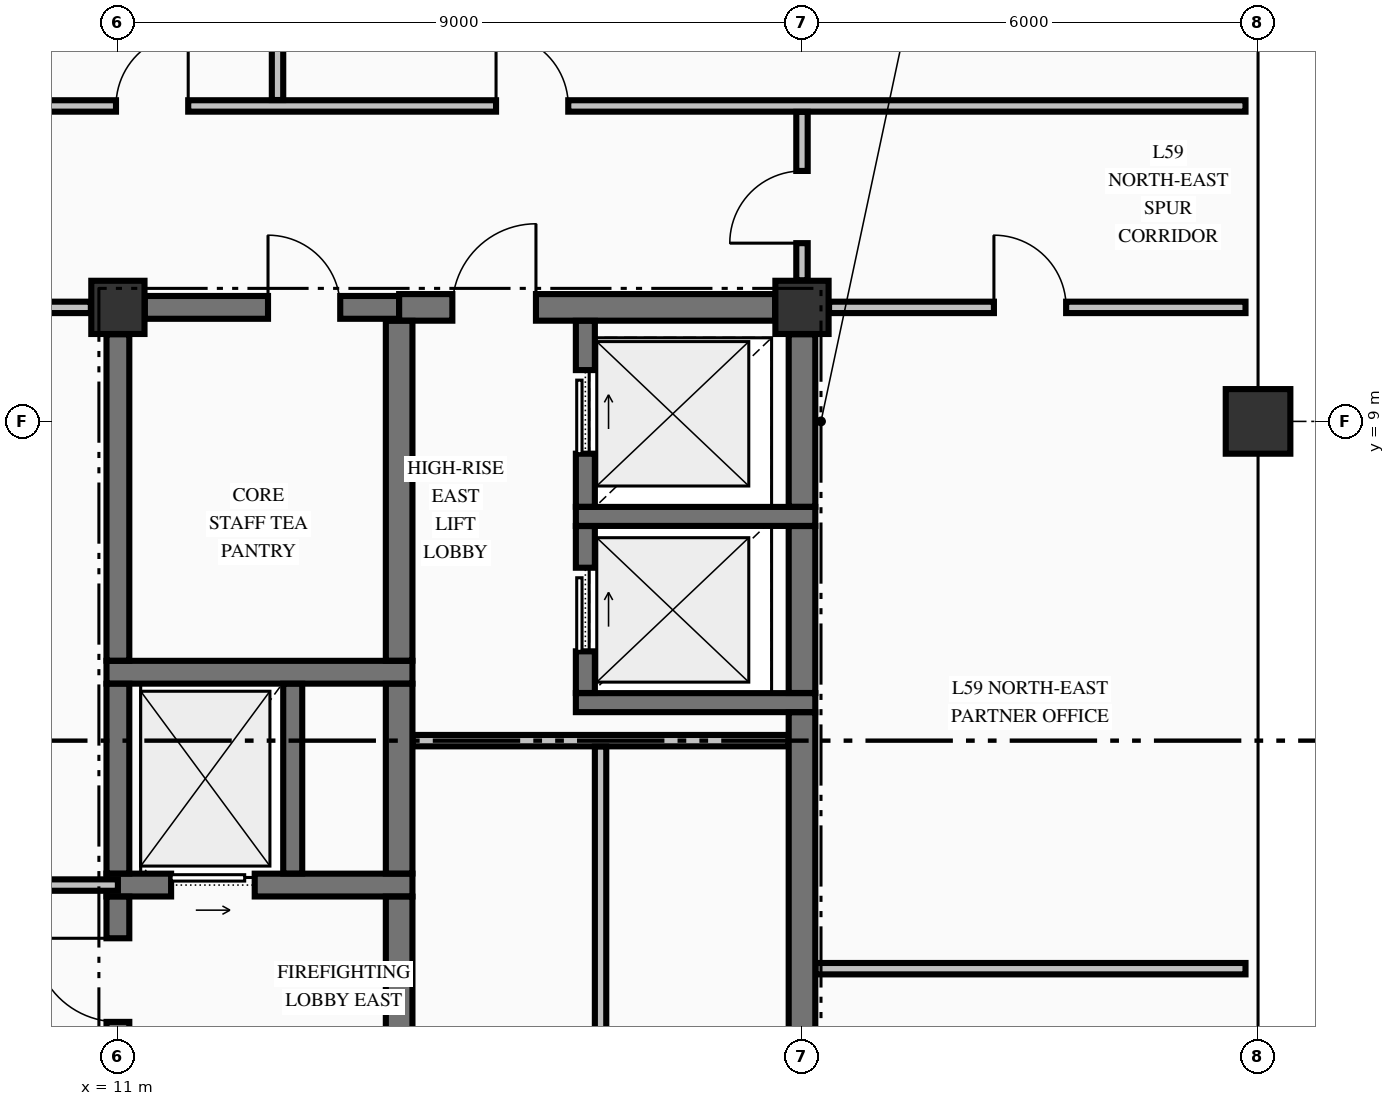
"""IFC4 building model, lengths in metres.
Left out: names, types, materials, properties, quantities, classifications, styles, units other than length and angle.
Written with IfcOpenShell. Run it as: python <this file> out.ifc"""

import sys

from ifc_helpers import new_model, si_unit, direction, frame, frame_2d, origin, origin_2d, place, context, subcontext, project, spatial, rectangle, extrude, element, fill, save


model = new_model("IFC4")
c1 = context("Model", 3, precision=1e-05, world=origin(), true_north=direction((0.0, 1.0)))
c2 = subcontext(c1, "Body", "Model", "MODEL_VIEW")
j1 = project(units=[si_unit("LENGTHUNIT", "METRE"), si_unit("PLANEANGLEUNIT", "RADIAN")], contexts=[c1])
p1 = place(None, origin())
s1 = spatial("IfcSite", under=j1, at=p1, CompositionType="ELEMENT")
p2 = place(p1, origin())
s2 = spatial("IfcBuilding", under=s1, at=p2, CompositionType="ELEMENT")
p3 = place(p2, frame((0.0, 0.0, 226.82)))
s3 = spatial("IfcBuildingStorey", under=s2, at=p3, CompositionType="ELEMENT", Elevation=226.82)
p4 = place(p3, frame((26.0, 9.0, -0.425), z_axis=(0.0, 0.0, 1.0), x_axis=(1.0, 0.0, 0.0)))
e1 = element("IfcColumn", 1, at=p4, inside=s3, PredefinedType="COLUMN", context=c2, shape_type="SweptSolid", body=[
    extrude(rectangle(XDim=0.85, YDim=0.85, at=origin_2d()), origin(), (0.0, 0.0, 1.0), 3.405),
])
for number, where, z_axis, x_axis in (
    (2, (11.0, 10.5, -0.425), (0.0, 0.0, 1.0), (1.0, 0.0, 0.0)),
    (3, (20.0, 10.5, -0.425), (0.0, 0.0, 1.0), (1.0, 0.0, 0.0)),
):
    element("IfcColumn", number, at=place(p3, frame(where, z_axis=z_axis, x_axis=x_axis)), inside=s3, PredefinedType="COLUMN", context=c2, shape_type="SweptSolid", body=[
        extrude(rectangle(XDim=0.7, YDim=0.7, at=origin_2d()), origin(), (0.0, 0.0, 1.0), 3.405),
    ])
p5 = place(p3, frame((10.85, 2.9, 0.0), z_axis=(0.0, 0.0, 1.0), x_axis=(1.0, 0.0, 0.0)))
e4 = element("IfcWall", 4, at=p5, inside=s3, PredefinedType="SHEAR", context=c2, shape_type="SweptSolid", body=[
    extrude(rectangle(XDim=4.025, YDim=0.3, at=frame_2d((2.012, 0.0))), origin(), (0.0, 0.0, 1.0), 2.98),
])
p6 = place(p5, frame((0.85, 0.0, 0.0)))
e5 = element("IfcOpeningElement", 5, at=p6, cuts=e4, PredefinedType="OPENING", context=c2, shape_type="SweptSolid", body=[
    extrude(rectangle(XDim=1.1, YDim=2.2, at=frame_2d((0.55, 1.1))), frame((0.0, 0.16, 0.0), z_axis=(0.0, -1.0, 0.0), x_axis=(1.0, 0.0, 0.0)), (0.0, 0.0, 1.0), 0.32),
])
p7 = place(p3, frame((17.025, 5.3, 0.0), z_axis=(0.0, 0.0, 1.0), x_axis=(1.0, 0.0, 0.0)))
e6 = element("IfcWall", 6, at=p7, inside=s3, PredefinedType="SOLIDWALL", context=c2, shape_type="SweptSolid", body=[
    extrude(rectangle(XDim=3.15, YDim=0.25, at=frame_2d((1.575, 0.0))), origin(), (0.0, 0.0, 1.0), 2.98),
])
p8 = place(p3, frame((10.85, 5.7, 0.0), z_axis=(0.0, 0.0, 1.0), x_axis=(1.0, 0.0, 0.0)))
e7 = element("IfcWall", 7, at=p8, inside=s3, PredefinedType="SHEAR", context=c2, shape_type="SweptSolid", body=[
    extrude(rectangle(XDim=4.025, YDim=0.3, at=frame_2d((2.012, 0.0))), origin(), (0.0, 0.0, 1.0), 2.98),
])
p9 = place(p3, frame((17.025, 7.75, 0.0), z_axis=(0.0, 0.0, 1.0), x_axis=(1.0, 0.0, 0.0)))
e8 = element("IfcWall", 8, at=p9, inside=s3, PredefinedType="SOLIDWALL", context=c2, shape_type="SweptSolid", body=[
    extrude(rectangle(XDim=3.15, YDim=0.25, at=frame_2d((1.575, 0.0))), origin(), (0.0, 0.0, 1.0), 2.98),
])
p10 = place(p3, frame((11.354, 10.5, 0.0), z_axis=(0.0, 0.0, 1.0), x_axis=(1.0, 0.0, 0.0)))
e9 = element("IfcWall", 9, at=p10, inside=s3, PredefinedType="SHEAR", context=c2, shape_type="SweptSolid", body=[
    extrude(rectangle(XDim=3.346, YDim=0.3, at=frame_2d((1.673, 0.0))), origin(), (0.0, 0.0, 1.0), 2.98),
])
p11 = place(p10, frame((1.621, 0.0, 0.0)))
e10 = element("IfcOpeningElement", 10, at=p11, cuts=e9, PredefinedType="OPENING", context=c2, shape_type="SweptSolid", body=[
    extrude(rectangle(XDim=0.95, YDim=2.15, at=frame_2d((0.475, 1.075))), frame((0.0, 0.16, 0.0), z_axis=(0.0, -1.0, 0.0), x_axis=(1.0, 0.0, 0.0)), (0.0, 0.0, 1.0), 0.32),
])
p12 = place(p3, frame((14.7, 10.5, 0.0), z_axis=(0.0, 0.0, 1.0), x_axis=(1.0, 0.0, 0.0)))
e11 = element("IfcWall", 11, at=p12, inside=s3, PredefinedType="SHEAR", context=c2, shape_type="SweptSolid", body=[
    extrude(rectangle(XDim=4.946, YDim=0.35, at=frame_2d((2.473, 0.0))), origin(), (0.0, 0.0, 1.0), 2.98),
])
p13 = place(p12, frame((0.7, 0.0, 0.0)))
e12 = element("IfcOpeningElement", 12, at=p13, cuts=e11, PredefinedType="OPENING", context=c2, shape_type="SweptSolid", body=[
    extrude(rectangle(XDim=1.1, YDim=2.15, at=frame_2d((0.55, 1.075))), frame((0.0, 0.185, 0.0), z_axis=(0.0, -1.0, 0.0), x_axis=(1.0, 0.0, 0.0)), (0.0, 0.0, 1.0), 0.37),
])
p14 = place(p3, frame((20.178, 1.8, 0.0), z_axis=(0.0, 0.0, 1.0), x_axis=(1.0, 0.0, 0.0)))
e13 = element("IfcWall", 13, at=p14, inside=s3, PredefinedType="PARTITIONING", context=c2, shape_type="SweptSolid", body=[
    extrude(rectangle(XDim=5.657, YDim=0.15, at=frame_2d((2.829, 0.0))), origin(), (0.0, 0.0, 1.0), 2.98),
])
p15 = place(p3, frame((-11.0, 2.9, 0.0), z_axis=(0.0, 0.0, 1.0), x_axis=(1.0, 0.0, 0.0)))
e14 = element("IfcWall", 14, at=p15, inside=s3, PredefinedType="PARTITIONING", context=c2, shape_type="SweptSolid", body=[
    extrude(rectangle(XDim=22.0, YDim=0.15, at=frame_2d((11.0, 0.0))), origin(), (0.0, 0.0, 1.0), 2.98),
])
p16 = place(p15, frame((14.65, 0.0, 0.0)))
e15 = element("IfcOpeningElement", 15, at=p16, cuts=e14, PredefinedType="OPENING", context=c2, shape_type="SweptSolid", body=[
    extrude(rectangle(XDim=1.1, YDim=2.15, at=frame_2d((0.55, 1.075))), frame((0.0, 0.085, 0.0), z_axis=(0.0, -1.0, 0.0), x_axis=(1.0, 0.0, 0.0)), (0.0, 0.0, 1.0), 0.17),
])
p17 = place(p15, frame((6.525, 0.0, 0.0)))
e16 = element("IfcOpeningElement", 16, at=p17, cuts=e14, PredefinedType="OPENING", context=c2, shape_type="SweptSolid", body=[
    extrude(rectangle(XDim=1.05, YDim=2.15, at=frame_2d((0.525, 1.075))), frame((0.0, 0.085, 0.0), z_axis=(0.0, -1.0, 0.0), x_axis=(1.0, 0.0, 0.0)), (0.0, 0.0, 1.0), 0.17),
])
p18 = place(p15, frame((18.6, 0.0, 0.0)))
e17 = element("IfcOpeningElement", 17, at=p18, cuts=e14, PredefinedType="OPENING", context=c2, shape_type="SweptSolid", body=[
    extrude(rectangle(XDim=1.1, YDim=2.15, at=frame_2d((0.55, 1.075))), frame((0.0, 0.085, 0.0), z_axis=(0.0, -1.0, 0.0), x_axis=(1.0, 0.0, 0.0)), (0.0, 0.0, 1.0), 0.17),
])
p19 = place(p3, frame((14.878, 4.8, 0.0), z_axis=(0.0, 0.0, 1.0), x_axis=(1.0, 0.0, 0.0)))
e18 = element("IfcWall", 18, at=p19, inside=s3, PredefinedType="PARTITIONING", context=c2, shape_type="SweptSolid", body=[
    extrude(rectangle(XDim=4.944, YDim=0.15, at=frame_2d((2.472, 0.0))), origin(), (0.0, 0.0, 1.0), 2.98),
])
p20 = place(p3, frame((-10.644, 10.5, 0.0), z_axis=(0.0, 0.0, 1.0), x_axis=(1.0, 0.0, 0.0)))
e19 = element("IfcWall", 19, at=p20, inside=s3, PredefinedType="PARTITIONING", context=c2, shape_type="SweptSolid", body=[
    extrude(rectangle(XDim=21.288, YDim=0.15, at=frame_2d((10.644, 0.0))), origin(), (0.0, 0.0, 1.0), 2.98),
])
p21 = place(p20, frame((14.294, 0.0, 0.0)))
e20 = element("IfcOpeningElement", 20, at=p21, cuts=e19, PredefinedType="OPENING", context=c2, shape_type="SweptSolid", body=[
    extrude(rectangle(XDim=1.1, YDim=2.15, at=frame_2d((0.55, 1.075))), frame((0.0, 0.085, 0.0), z_axis=(0.0, -1.0, 0.0), x_axis=(1.0, 0.0, 0.0)), (0.0, 0.0, 1.0), 0.17),
])
p22 = place(p3, frame((20.356, 10.5, 0.0), z_axis=(0.0, 0.0, 1.0), x_axis=(1.0, 0.0, 0.0)))
e21 = element("IfcWall", 21, at=p22, inside=s3, PredefinedType="PARTITIONING", context=c2, shape_type="SweptSolid", body=[
    extrude(rectangle(XDim=5.479, YDim=0.15, at=frame_2d((2.74, 0.0))), origin(), (0.0, 0.0, 1.0), 2.98),
])
p23 = place(p22, frame((2.169, 0.0, 0.0)))
e22 = element("IfcOpeningElement", 22, at=p23, cuts=e21, PredefinedType="OPENING", context=c2, shape_type="SweptSolid", body=[
    extrude(rectangle(XDim=0.95, YDim=2.15, at=frame_2d((0.475, 1.075))), frame((0.0, 0.085, 0.0), z_axis=(0.0, -1.0, 0.0), x_axis=(1.0, 0.0, 0.0)), (0.0, 0.0, 1.0), 0.17),
])
p24 = place(p3, frame((-20.075, 13.15, 0.0), z_axis=(0.0, 0.0, 1.0), x_axis=(1.0, 0.0, 0.0)))
e23 = element("IfcWall", 23, at=p24, inside=s3, PredefinedType="PARTITIONING", context=c2, shape_type="SweptSolid", body=[
    extrude(rectangle(XDim=45.91, YDim=0.15, at=frame_2d((22.955, 0.0))), origin(), (0.0, 0.0, 1.0), 2.98),
])
p25 = place(p24, frame((9.05, 0.0, 0.0)))
e24 = element("IfcOpeningElement", 24, at=p25, cuts=e23, PredefinedType="OPENING", context=c2, shape_type="SweptSolid", body=[
    extrude(rectangle(XDim=0.95, YDim=2.15, at=frame_2d((0.475, 1.075))), frame((0.0, 0.085, 0.0), z_axis=(0.0, -1.0, 0.0), x_axis=(1.0, 0.0, 0.0)), (0.0, 0.0, 1.0), 0.17),
])
p26 = place(p24, frame((15.25, 0.0, 0.0)))
e25 = element("IfcOpeningElement", 25, at=p26, cuts=e23, PredefinedType="OPENING", context=c2, shape_type="SweptSolid", body=[
    extrude(rectangle(XDim=1.05, YDim=2.15, at=frame_2d((0.525, 1.075))), frame((0.0, 0.085, 0.0), z_axis=(0.0, -1.0, 0.0), x_axis=(1.0, 0.0, 0.0)), (0.0, 0.0, 1.0), 0.17),
])
p27 = place(p24, frame((23.3, 0.0, 0.0)))
e26 = element("IfcOpeningElement", 26, at=p27, cuts=e23, PredefinedType="OPENING", context=c2, shape_type="SweptSolid", body=[
    extrude(rectangle(XDim=0.95, YDim=2.15, at=frame_2d((0.475, 1.075))), frame((0.0, 0.085, 0.0), z_axis=(0.0, -1.0, 0.0), x_axis=(1.0, 0.0, 0.0)), (0.0, 0.0, 1.0), 0.17),
])
p28 = place(p24, frame((31.05, 0.0, 0.0)))
e27 = element("IfcOpeningElement", 27, at=p28, cuts=e23, PredefinedType="OPENING", context=c2, shape_type="SweptSolid", body=[
    extrude(rectangle(XDim=0.95, YDim=2.15, at=frame_2d((0.475, 1.075))), frame((0.0, 0.085, 0.0), z_axis=(0.0, -1.0, 0.0), x_axis=(1.0, 0.0, 0.0)), (0.0, 0.0, 1.0), 0.17),
])
p29 = place(p24, frame((36.05, 0.0, 0.0)))
e28 = element("IfcOpeningElement", 28, at=p29, cuts=e23, PredefinedType="OPENING", context=c2, shape_type="SweptSolid", body=[
    extrude(rectangle(XDim=0.95, YDim=2.15, at=frame_2d((0.475, 1.075))), frame((0.0, 0.085, 0.0), z_axis=(0.0, -1.0, 0.0), x_axis=(1.0, 0.0, 0.0)), (0.0, 0.0, 1.0), 0.17),
])
p30 = place(p3, frame((11.0, 0.354, 0.0), z_axis=(0.0, 0.0, 1.0), x_axis=(0.0, 1.0, 0.0)))
e29 = element("IfcWall", 29, at=p30, inside=s3, PredefinedType="SHEAR", context=c2, shape_type="SweptSolid", body=[
    extrude(rectangle(XDim=2.394, YDim=0.3, at=frame_2d((1.197, 0.0))), origin(), (0.0, 0.0, 1.0), 2.98),
])
p31 = place(p30, frame((0.746, 0.0, 0.0)))
e30 = element("IfcOpeningElement", 30, at=p31, cuts=e29, PredefinedType="OPENING", context=c2, shape_type="SweptSolid", body=[
    extrude(rectangle(XDim=1.1, YDim=2.15, at=frame_2d((0.55, 1.075))), frame((0.0, 0.16, 0.0), z_axis=(0.0, -1.0, 0.0), x_axis=(1.0, 0.0, 0.0)), (0.0, 0.0, 1.0), 0.32),
])
p32 = place(p3, frame((11.0, 3.052, 0.0), z_axis=(0.0, 0.0, 1.0), x_axis=(0.0, 1.0, 0.0)))
e31 = element("IfcWall", 31, at=p32, inside=s3, PredefinedType="SHEAR", context=c2, shape_type="SweptSolid", body=[
    extrude(rectangle(XDim=2.496, YDim=0.3, at=frame_2d((1.248, 0.0))), origin(), (0.0, 0.0, 1.0), 2.98),
])
p33 = place(p3, frame((11.0, 5.852, 0.0), z_axis=(0.0, 0.0, 1.0), x_axis=(0.0, 1.0, 0.0)))
e32 = element("IfcWall", 32, at=p33, inside=s3, PredefinedType="SHEAR", context=c2, shape_type="SweptSolid", body=[
    extrude(rectangle(XDim=4.294, YDim=0.3, at=frame_2d((2.147, 0.0))), origin(), (0.0, 0.0, 1.0), 2.98),
])
p34 = place(p3, frame((13.3, 3.052, 0.0), z_axis=(0.0, 0.0, 1.0), x_axis=(0.0, 1.0, 0.0)))
e33 = element("IfcWall", 33, at=p34, inside=s3, PredefinedType="SOLIDWALL", context=c2, shape_type="SweptSolid", body=[
    extrude(rectangle(XDim=2.496, YDim=0.25, at=frame_2d((1.248, 0.0))), origin(), (0.0, 0.0, 1.0), 2.98),
])
p35 = place(p3, frame((14.7, -0.098, 0.0), z_axis=(0.0, 0.0, 1.0), x_axis=(0.0, 1.0, 0.0)))
e34 = element("IfcWall", 34, at=p35, inside=s3, PredefinedType="SHEAR", context=c2, shape_type="SweptSolid", body=[
    extrude(rectangle(XDim=2.846, YDim=0.35, at=frame_2d((1.423, 0.0))), origin(), (0.0, 0.0, 1.0), 2.98),
])
p36 = place(p3, frame((14.7, 3.052, 0.0), z_axis=(0.0, 0.0, 1.0), x_axis=(0.0, 1.0, 0.0)))
e35 = element("IfcWall", 35, at=p36, inside=s3, PredefinedType="SHEAR", context=c2, shape_type="SweptSolid", body=[
    extrude(rectangle(XDim=2.496, YDim=0.35, at=frame_2d((1.248, 0.0))), origin(), (0.0, 0.0, 1.0), 2.98),
])
p37 = place(p3, frame((14.7, 5.852, 0.0), z_axis=(0.0, 0.0, 1.0), x_axis=(0.0, 1.0, 0.0)))
e36 = element("IfcWall", 36, at=p37, inside=s3, PredefinedType="SHEAR", context=c2, shape_type="SweptSolid", body=[
    extrude(rectangle(XDim=4.471, YDim=0.35, at=frame_2d((2.235, 0.0))), origin(), (0.0, 0.0, 1.0), 2.98),
])
p38 = place(p3, frame((17.15, 5.427, 0.0), z_axis=(0.0, 0.0, 1.0), x_axis=(0.0, 1.0, 0.0)))
e37 = element("IfcWall", 37, at=p38, inside=s3, PredefinedType="SOLIDWALL", context=c2, shape_type="SweptSolid", body=[
    extrude(rectangle(XDim=2.196, YDim=0.25, at=frame_2d((1.098, 0.0))), origin(), (0.0, 0.0, 1.0), 2.98),
])
p39 = place(p38, frame((0.548, 0.0, 0.0)))
e38 = element("IfcOpeningElement", 38, at=p39, cuts=e37, PredefinedType="OPENING", context=c2, shape_type="SweptSolid", body=[
    extrude(rectangle(XDim=1.1, YDim=2.2, at=frame_2d((0.55, 1.1))), frame((0.0, 0.135, 0.0), z_axis=(0.0, -1.0, 0.0), x_axis=(1.0, 0.0, 0.0)), (0.0, 0.0, 1.0), 0.27),
])
p40 = place(p3, frame((17.15, 7.877, 0.0), z_axis=(0.0, 0.0, 1.0), x_axis=(0.0, 1.0, 0.0)))
e39 = element("IfcWall", 39, at=p40, inside=s3, PredefinedType="SOLIDWALL", context=c2, shape_type="SweptSolid", body=[
    extrude(rectangle(XDim=2.446, YDim=0.25, at=frame_2d((1.223, 0.0))), origin(), (0.0, 0.0, 1.0), 2.98),
])
p41 = place(p40, frame((0.698, 0.0, 0.0)))
e40 = element("IfcOpeningElement", 40, at=p41, cuts=e39, PredefinedType="OPENING", context=c2, shape_type="SweptSolid", body=[
    extrude(rectangle(XDim=1.1, YDim=2.2, at=frame_2d((0.55, 1.1))), frame((0.0, 0.135, 0.0), z_axis=(0.0, -1.0, 0.0), x_axis=(1.0, 0.0, 0.0)), (0.0, 0.0, 1.0), 0.27),
])
p42 = place(p3, frame((20.0, 0.354, 0.0), z_axis=(0.0, 0.0, 1.0), x_axis=(0.0, 1.0, 0.0)))
e41 = element("IfcWall", 41, at=p42, inside=s3, PredefinedType="SHEAR", context=c2, shape_type="SweptSolid", body=[
    extrude(rectangle(XDim=4.819, YDim=0.35, at=frame_2d((2.41, 0.0))), origin(), (0.0, 0.0, 1.0), 2.98),
])
p43 = place(p3, frame((20.0, 5.427, 0.0), z_axis=(0.0, 0.0, 1.0), x_axis=(0.0, 1.0, 0.0)))
e42 = element("IfcWall", 42, at=p43, inside=s3, PredefinedType="SHEAR", context=c2, shape_type="SweptSolid", body=[
    extrude(rectangle(XDim=2.196, YDim=0.35, at=frame_2d((1.098, 0.0))), origin(), (0.0, 0.0, 1.0), 2.98),
])
p44 = place(p3, frame((20.0, 7.877, 0.0), z_axis=(0.0, 0.0, 1.0), x_axis=(0.0, 1.0, 0.0)))
e43 = element("IfcWall", 43, at=p44, inside=s3, PredefinedType="SHEAR", context=c2, shape_type="SweptSolid", body=[
    extrude(rectangle(XDim=2.269, YDim=0.35, at=frame_2d((1.135, 0.0))), origin(), (0.0, 0.0, 1.0), 2.98),
])
p45 = place(p3, frame((13.1, 13.228, 0.0), z_axis=(0.0, 0.0, 1.0), x_axis=(0.0, 1.0, 0.0)))
e44 = element("IfcWall", 44, at=p45, inside=s3, PredefinedType="PARTITIONING", context=c2, shape_type="SweptSolid", body=[
    extrude(rectangle(XDim=10.107, YDim=0.15, at=frame_2d((5.053, 0.0))), origin(), (0.0, 0.0, 1.0), 2.98),
])
p46 = place(p3, frame((17.35, -9.772, 0.0), z_axis=(0.0, 0.0, 1.0), x_axis=(0.0, 1.0, 0.0)))
e45 = element("IfcWall", 45, at=p46, inside=s3, PredefinedType="PARTITIONING", context=c2, shape_type="SweptSolid", body=[
    extrude(rectangle(XDim=14.494, YDim=0.15, at=frame_2d((7.247, 0.0))), origin(), (0.0, 0.0, 1.0), 2.98),
])
p47 = place(p3, frame((20.0, 10.856, 0.0), z_axis=(0.0, 0.0, 1.0), x_axis=(0.0, 1.0, 0.0)))
e46 = element("IfcWall", 46, at=p47, inside=s3, PredefinedType="PARTITIONING", context=c2, shape_type="SweptSolid", body=[
    extrude(rectangle(XDim=2.216, YDim=0.15, at=frame_2d((1.108, 0.0))), origin(), (0.0, 0.0, 1.0), 2.98),
])
p48 = place(p47, frame((0.489, 0.0, 0.0)))
e47 = element("IfcOpeningElement", 47, at=p48, cuts=e46, PredefinedType="OPENING", context=c2, shape_type="SweptSolid", body=[
    extrude(rectangle(XDim=0.95, YDim=2.15, at=frame_2d((0.475, 1.075))), frame((0.0, 0.085, 0.0), z_axis=(0.0, -1.0, 0.0), x_axis=(1.0, 0.0, 0.0)), (0.0, 0.0, 1.0), 0.17),
])
p49 = place(p31, origin())
e48 = element("IfcDoor", 48, at=p49, inside=s3, OperationType="SINGLE_SWING_RIGHT", PredefinedType="DOOR", context=c2, shape_type="SweptSolid", body=[
    extrude(rectangle(XDim=1.1, YDim=2.15, at=frame_2d((0.55, 1.075))), frame((0.0, 0.025, 0.0), z_axis=(0.0, -1.0, 0.0), x_axis=(1.0, 0.0, 0.0)), (0.0, 0.0, 1.0), 0.05),
])
fill(e30, e48)
p50 = place(p6, origin())
e49 = element("IfcDoor", 49, at=p50, inside=s3, OperationType="SLIDING_TO_RIGHT", PredefinedType="DOOR", context=c2, shape_type="SweptSolid", body=[
    extrude(rectangle(XDim=1.1, YDim=2.2, at=frame_2d((0.55, 1.1))), frame((0.0, 0.025, 0.0), z_axis=(0.0, -1.0, 0.0), x_axis=(1.0, 0.0, 0.0)), (0.0, 0.0, 1.0), 0.05),
])
fill(e5, e49)
p51 = place(p11, origin())
e50 = element("IfcDoor", 50, at=p51, inside=s3, OperationType="SINGLE_SWING_LEFT", PredefinedType="DOOR", context=c2, shape_type="SweptSolid", body=[
    extrude(rectangle(XDim=0.95, YDim=2.15, at=frame_2d((0.475, 1.075))), frame((0.0, 0.025, 0.0), z_axis=(0.0, -1.0, 0.0), x_axis=(1.0, 0.0, 0.0)), (0.0, 0.0, 1.0), 0.05),
])
fill(e10, e50)
p52 = place(p39, origin())
e51 = element("IfcDoor", 51, at=p52, inside=s3, OperationType="SLIDING_TO_RIGHT", PredefinedType="DOOR", context=c2, shape_type="SweptSolid", body=[
    extrude(rectangle(XDim=1.1, YDim=2.2, at=frame_2d((0.55, 1.1))), frame((0.0, 0.025, 0.0), z_axis=(0.0, -1.0, 0.0), x_axis=(1.0, 0.0, 0.0)), (0.0, 0.0, 1.0), 0.05),
])
fill(e38, e51)
p53 = place(p41, origin())
e52 = element("IfcDoor", 52, at=p53, inside=s3, OperationType="SLIDING_TO_RIGHT", PredefinedType="DOOR", context=c2, shape_type="SweptSolid", body=[
    extrude(rectangle(XDim=1.1, YDim=2.2, at=frame_2d((0.55, 1.1))), frame((0.0, 0.025, 0.0), z_axis=(0.0, -1.0, 0.0), x_axis=(1.0, 0.0, 0.0)), (0.0, 0.0, 1.0), 0.05),
])
fill(e40, e52)
p54 = place(p13, origin())
e53 = element("IfcDoor", 53, at=p54, inside=s3, OperationType="SINGLE_SWING_RIGHT", PredefinedType="DOOR", context=c2, shape_type="SweptSolid", body=[
    extrude(rectangle(XDim=1.1, YDim=2.15, at=frame_2d((0.55, 1.075))), frame((0.0, 0.025, 0.0), z_axis=(0.0, -1.0, 0.0), x_axis=(1.0, 0.0, 0.0)), (0.0, 0.0, 1.0), 0.05),
])
fill(e12, e53)
p55 = place(p28, origin())
e54 = element("IfcDoor", 54, at=p55, inside=s3, OperationType="SINGLE_SWING_RIGHT", PredefinedType="DOOR", context=c2, shape_type="SweptSolid", body=[
    extrude(rectangle(XDim=0.95, YDim=2.15, at=frame_2d((0.475, 1.075))), frame((0.0, 0.025, 0.0), z_axis=(0.0, -1.0, 0.0), x_axis=(1.0, 0.0, 0.0)), (0.0, 0.0, 1.0), 0.05),
])
fill(e27, e54)
p56 = place(p29, origin())
e55 = element("IfcDoor", 55, at=p56, inside=s3, OperationType="SINGLE_SWING_LEFT", PredefinedType="DOOR", context=c2, shape_type="SweptSolid", body=[
    extrude(rectangle(XDim=0.95, YDim=2.15, at=frame_2d((0.475, 1.075))), frame((0.0, 0.025, 0.0), z_axis=(0.0, -1.0, 0.0), x_axis=(1.0, 0.0, 0.0)), (0.0, 0.0, 1.0), 0.05),
])
fill(e28, e55)
p57 = place(p48, origin())
e56 = element("IfcDoor", 56, at=p57, inside=s3, OperationType="SINGLE_SWING_LEFT", PredefinedType="DOOR", context=c2, shape_type="SweptSolid", body=[
    extrude(rectangle(XDim=0.95, YDim=2.15, at=frame_2d((0.475, 1.075))), frame((0.0, 0.025, 0.0), z_axis=(0.0, -1.0, 0.0), x_axis=(1.0, 0.0, 0.0)), (0.0, 0.0, 1.0), 0.05),
])
fill(e47, e56)
p58 = place(p23, origin())
e57 = element("IfcDoor", 57, at=p58, inside=s3, OperationType="SINGLE_SWING_LEFT", PredefinedType="DOOR", context=c2, shape_type="SweptSolid", body=[
    extrude(rectangle(XDim=0.95, YDim=2.15, at=frame_2d((0.475, 1.075))), frame((0.0, 0.025, 0.0), z_axis=(0.0, -1.0, 0.0), x_axis=(1.0, 0.0, 0.0)), (0.0, 0.0, 1.0), 0.05),
])
fill(e22, e57)
save(model, sys.argv[1])
